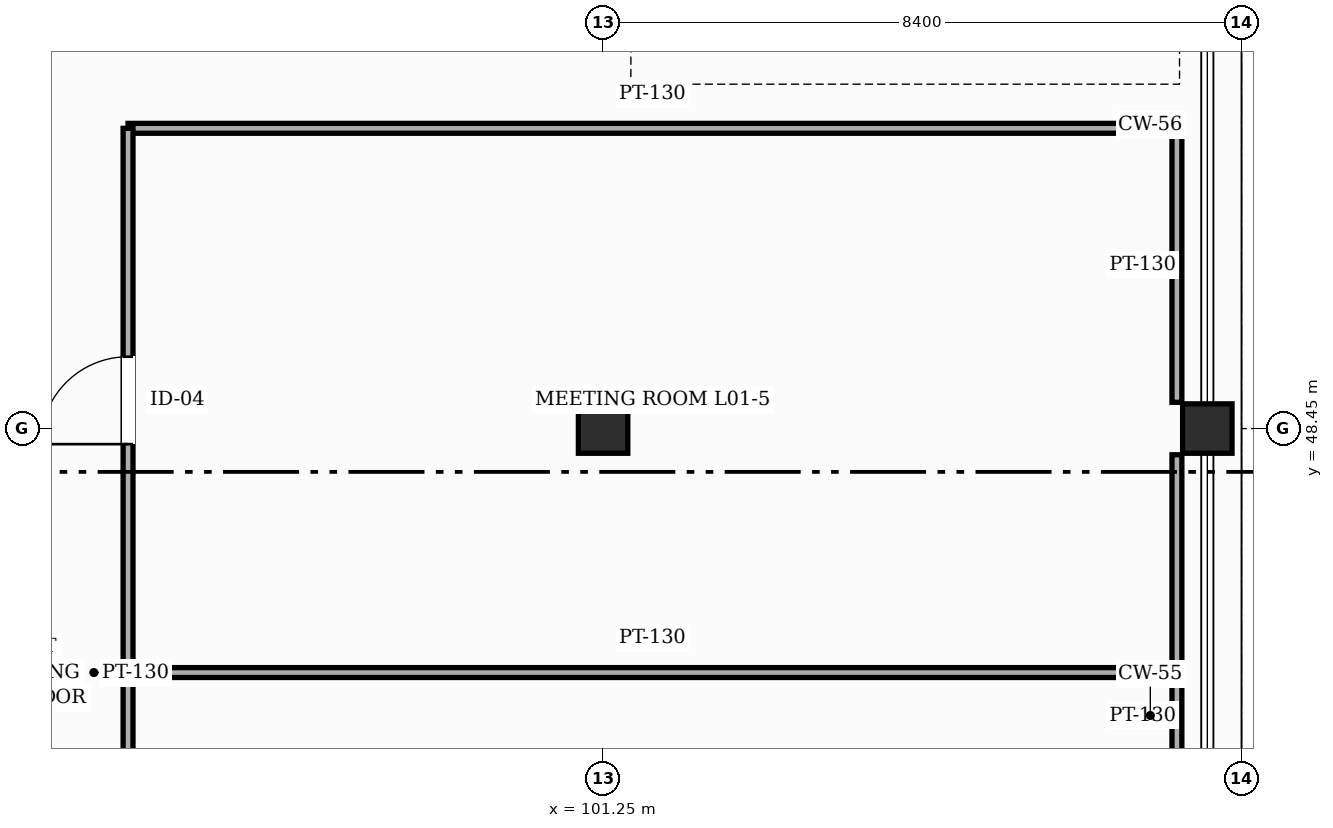
"""IFC4 building model, lengths in metres.
Left out: names, types, materials, properties, quantities, classifications, styles, units other than length and angle.
Written with IfcOpenShell. Run it as: python <this file> out.ifc"""

import sys

from ifc_helpers import new_model, si_unit, direction, frame, frame_2d, origin, origin_2d, place, context, subcontext, project, spatial, rectangle, hollow_rectangle, extrude, element, fill, save


model = new_model("IFC4")
c1 = context("Model", 3, precision=1e-05, world=origin(), true_north=direction((0.0, 1.0)))
c2 = subcontext(c1, "Body", "Model", "MODEL_VIEW")
j1 = project(units=[si_unit("LENGTHUNIT", "METRE"), si_unit("PLANEANGLEUNIT", "RADIAN")], contexts=[c1])
p1 = place(None, origin())
s1 = spatial("IfcSite", under=j1, at=p1, CompositionType="ELEMENT")
p2 = place(p1, origin())
s2 = spatial("IfcBuilding", under=s1, at=p2, CompositionType="ELEMENT")
p3 = place(p2, frame((0.0, 0.0, 5.4)))
s3 = spatial("IfcBuildingStorey", under=s2, at=p3, CompositionType="ELEMENT", Elevation=5.4)
for number, where, z_axis, x_axis in (
    (1, (101.25, 48.45, 0.0), (0.0, 0.0, 1.0), (1.0, 0.0, 0.0)),
    (2, (109.2, 48.45, 0.0), (0.0, 0.0, 1.0), (1.0, 0.0, 0.0)),
):
    element("IfcColumn", number, at=place(p3, frame(where, z_axis=z_axis, x_axis=x_axis)), inside=s3, PredefinedType="COLUMN", context=c2, shape_type="SweptSolid", body=[
        extrude(hollow_rectangle(XDim=0.65, YDim=0.65, WallThickness=0.025, InnerFilletRadius=0.025, OuterFilletRadius=0.05, at=origin_2d()), origin(), (0.0, 0.0, 1.0), 4.8),
    ])
p4 = place(p3, frame((95.0, 45.24, 0.0), z_axis=(0.0, 0.0, 1.0), x_axis=(1.0, 0.0, 0.0)))
e3 = element("IfcWall", 3, at=p4, inside=s3, PredefinedType="PARTITIONING", context=c2, shape_type="SweptSolid", body=[
    extrude(rectangle(XDim=13.8, YDim=0.13, at=frame_2d((6.9, 0.0))), origin(), (0.0, 0.0, 1.0), 4.535),
])
p5 = place(p3, frame((95.0, 52.4, 0.0), z_axis=(0.0, 0.0, 1.0), x_axis=(1.0, 0.0, 0.0)))
e4 = element("IfcWall", 4, at=p5, inside=s3, PredefinedType="PARTITIONING", context=c2, shape_type="SweptSolid", body=[
    extrude(rectangle(XDim=13.8, YDim=0.13, at=frame_2d((6.9, 0.0))), origin(), (0.0, 0.0, 1.0), 4.125),
])
p6 = place(p3, frame((95.0, 16.6, 0.0), z_axis=(0.0, 0.0, 1.0), x_axis=(0.0, 1.0, 0.0)))
e5 = element("IfcWall", 5, at=p6, inside=s3, PredefinedType="PARTITIONING", context=c2, shape_type="SweptSolid", body=[
    extrude(rectangle(XDim=35.8, YDim=0.13, at=frame_2d((17.9, 0.0))), origin(), (0.0, 0.0, 1.0), 4.535),
])
p7 = place(p6, frame((3.005, 0.0, 0.0)))
e6 = element("IfcOpeningElement", 6, at=p7, cuts=e5, PredefinedType="OPENING", context=c2, shape_type="SweptSolid", body=[
    extrude(rectangle(XDim=1.15, YDim=2.22, at=frame_2d((0.575, 1.11))), frame((0.0, 0.075, 0.0), z_axis=(0.0, -1.0, 0.0), x_axis=(1.0, 0.0, 0.0)), (0.0, 0.0, 1.0), 0.15),
])
p8 = place(p6, frame((10.165, 0.0, 0.0)))
e7 = element("IfcOpeningElement", 7, at=p8, cuts=e5, PredefinedType="OPENING", context=c2, shape_type="SweptSolid", body=[
    extrude(rectangle(XDim=1.15, YDim=2.22, at=frame_2d((0.575, 1.11))), frame((0.0, 0.075, 0.0), z_axis=(0.0, -1.0, 0.0), x_axis=(1.0, 0.0, 0.0)), (0.0, 0.0, 1.0), 0.15),
])
p9 = place(p6, frame((17.325, 0.0, 0.0)))
e8 = element("IfcOpeningElement", 8, at=p9, cuts=e5, PredefinedType="OPENING", context=c2, shape_type="SweptSolid", body=[
    extrude(rectangle(XDim=1.15, YDim=2.22, at=frame_2d((0.575, 1.11))), frame((0.0, 0.075, 0.0), z_axis=(0.0, -1.0, 0.0), x_axis=(1.0, 0.0, 0.0)), (0.0, 0.0, 1.0), 0.15),
])
p10 = place(p6, frame((24.485, 0.0, 0.0)))
e9 = element("IfcOpeningElement", 9, at=p10, cuts=e5, PredefinedType="OPENING", context=c2, shape_type="SweptSolid", body=[
    extrude(rectangle(XDim=1.15, YDim=2.22, at=frame_2d((0.575, 1.11))), frame((0.0, 0.075, 0.0), z_axis=(0.0, -1.0, 0.0), x_axis=(1.0, 0.0, 0.0)), (0.0, 0.0, 1.0), 0.15),
])
p11 = place(p6, frame((31.645, 0.0, 0.0)))
e10 = element("IfcOpeningElement", 10, at=p11, cuts=e5, PredefinedType="OPENING", context=c2, shape_type="SweptSolid", body=[
    extrude(rectangle(XDim=1.15, YDim=2.22, at=frame_2d((0.575, 1.11))), frame((0.0, 0.075, 0.0), z_axis=(0.0, -1.0, 0.0), x_axis=(1.0, 0.0, 0.0)), (0.0, 0.0, 1.0), 0.15),
])
p12 = place(p3, frame((108.8, 41.245, 0.0), z_axis=(0.0, 0.0, 1.0), x_axis=(0.0, 1.0, 0.0)))
e11 = element("IfcWall", 11, at=p12, inside=s3, PredefinedType="PARTITIONING", context=c2, shape_type="SweptSolid", body=[
    extrude(rectangle(XDim=6.86, YDim=0.13, at=frame_2d((3.43, 0.0))), origin(), (0.0, 0.0, 1.0), 4.535),
])
p13 = place(p3, frame((108.8, 48.795, 0.0), z_axis=(0.0, 0.0, 1.0), x_axis=(0.0, 1.0, 0.0)))
e12 = element("IfcWall", 12, at=p13, inside=s3, PredefinedType="PARTITIONING", context=c2, shape_type="SweptSolid", body=[
    extrude(rectangle(XDim=3.605, YDim=0.13, at=frame_2d((1.802, 0.0))), origin(), (0.0, 0.0, 1.0), 4.535),
])
p14 = place(p11, origin())
e13 = element("IfcDoor", 13, at=p14, inside=s3, OperationType="SINGLE_SWING_LEFT", PredefinedType="DOOR", context=c2, shape_type="SweptSolid", body=[
    extrude(rectangle(XDim=1.15, YDim=2.22, at=frame_2d((0.575, 1.11))), frame((0.0, 0.025, 0.0), z_axis=(0.0, -1.0, 0.0), x_axis=(1.0, 0.0, 0.0)), (0.0, 0.0, 1.0), 0.05),
])
fill(e10, e13)
save(model, sys.argv[1])
